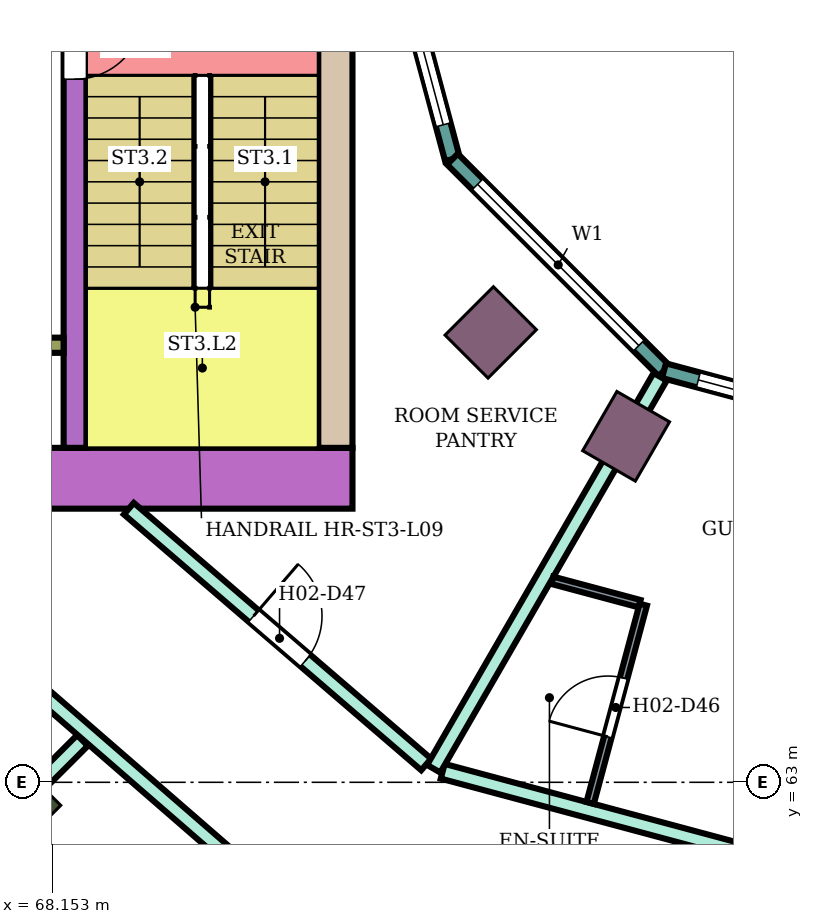
"""IFC4 building model, lengths in metres.
Left out: names, types, materials, properties, quantities, classifications, styles, units other than length and angle.
Written with IfcOpenShell. Run it as: python <this file> out.ifc"""

import sys

from ifc_helpers import new_model, si_unit, direction, frame, frame_2d, origin, origin_2d, place, context, subcontext, project, spatial, rectangle, extrude, element, fill, save


model = new_model("IFC4")
c1 = context("Model", 3, precision=1e-05, world=origin(), true_north=direction((0.0, 1.0)))
c2 = subcontext(c1, "Body", "Model", "MODEL_VIEW")
j1 = project(units=[si_unit("LENGTHUNIT", "METRE"), si_unit("PLANEANGLEUNIT", "RADIAN")], contexts=[c1])
p1 = place(None, origin())
s1 = spatial("IfcSite", under=j1, at=p1, CompositionType="ELEMENT")
p2 = place(p1, origin())
s2 = spatial("IfcBuilding", under=s1, at=p2, CompositionType="ELEMENT")
p3 = place(p2, frame((0.0, 0.0, 44.0)))
s3 = spatial("IfcBuildingStorey", under=s2, at=p3, CompositionType="ELEMENT", Elevation=44.0)
p4 = place(p3, frame((67.555, 62.555, 0.0), z_axis=(0.0, 0.0, 1.0), x_axis=(-0.707106781187, -0.707106781187, 0.0)))
e1 = element("IfcColumn", 1, at=p4, inside=s3, PredefinedType="COLUMN", context=c2, shape_type="SweptSolid", body=[
    extrude(rectangle(XDim=1.2, YDim=0.8, at=origin_2d()), origin(), (0.0, 0.0, 1.0), 3.8),
])
for number, where, z_axis, x_axis in (
    (2, (73.919, 68.919, 0.0), (0.0, 0.0, 1.0), (-0.707, -0.707, 0.0)),
    (3, (75.7, 67.552, 0.0), (0.0, 0.0, 1.0), (-0.5, -0.866, 0.0)),
):
    element("IfcColumn", number, at=place(p3, frame(where, z_axis=z_axis, x_axis=x_axis)), inside=s3, PredefinedType="COLUMN", context=c2, shape_type="SweptSolid", body=[
        extrude(rectangle(XDim=0.9, YDim=0.8, at=origin_2d()), origin(), (0.0, 0.0, 1.0), 3.8),
    ])
p5 = place(p3, frame((72.1, 67.0, 0.0), z_axis=(0.0, 0.0, 1.0), x_axis=(-1.0, 0.0, 0.0)))
e4 = element("IfcWall", 4, at=p5, inside=s3, PredefinedType="SHEAR", context=c2, shape_type="SweptSolid", body=[
    extrude(rectangle(XDim=14.7, YDim=0.8, at=frame_2d((7.35, 0.0))), origin(), (0.0, 0.0, 1.0), 3.48),
])
p6 = place(p5, frame((4.2, 0.0, 0.0)))
e5 = element("IfcOpeningElement", 5, at=p6, cuts=e4, PredefinedType="OPENING", context=c2, shape_type="SweptSolid", body=[
    extrude(rectangle(XDim=2.4, YDim=2.4, at=frame_2d((1.2, 1.2))), frame((0.0, 0.41, 0.0), z_axis=(0.0, -1.0, 0.0), x_axis=(1.0, 0.0, 0.0)), (0.0, 0.0, 1.0), 0.82),
])
p7 = place(p3, frame((71.875, 75.0, 0.0), z_axis=(0.0, 0.0, 1.0), x_axis=(0.0, -1.0, 0.0)))
e6 = element("IfcWall", 6, at=p7, inside=s3, PredefinedType="SHEAR", context=c2, shape_type="SweptSolid", body=[
    extrude(rectangle(XDim=7.6, YDim=0.45, at=frame_2d((3.8, 0.0))), origin(), (0.0, 0.0, 1.0), 3.48),
])
p8 = place(p3, frame((68.45, 75.0, 0.0), z_axis=(0.0, 0.0, 1.0), x_axis=(0.0, -1.0, 0.0)))
e7 = element("IfcWall", 7, at=p8, inside=s3, PredefinedType="SHEAR", context=c2, shape_type="SweptSolid", body=[
    extrude(rectangle(XDim=7.6, YDim=0.3, at=frame_2d((3.8, 0.0))), origin(), (0.0, 0.0, 1.0), 3.48),
])
p9 = place(p8, frame((1.85, 0.0, 0.0)))
e8 = element("IfcOpeningElement", 8, at=p9, cuts=e7, PredefinedType="OPENING", context=c2, shape_type="SweptSolid", body=[
    extrude(rectangle(XDim=0.9, YDim=2.1, at=frame_2d((0.45, 1.05))), frame((0.0, 0.16, 0.0), z_axis=(0.0, -1.0, 0.0), x_axis=(1.0, 0.0, 0.0)), (0.0, 0.0, 1.0), 0.32),
])
p10 = place(p3, frame((68.3, 68.75, 0.0), z_axis=(0.0, 0.0, 1.0), x_axis=(-1.0, 0.0, 0.0)))
e9 = element("IfcWall", 9, at=p10, inside=s3, PredefinedType="SHEAR", context=c2, shape_type="SweptSolid", body=[
    extrude(rectangle(XDim=4.65, YDim=0.2, at=frame_2d((2.325, 0.0))), origin(), (0.0, 0.0, 1.0), 3.48),
])
p11 = place(p3, frame((72.396, 75.0, 0.0), z_axis=(0.0, 0.0, 1.0), x_axis=(0.258789828301, -0.965933654434, 0.0)))
e10 = element("IfcWall", 10, at=p11, inside=s3, PredefinedType="NOTDEFINED", context=c2, shape_type="SweptSolid", body=[
    extrude(rectangle(XDim=3.936, YDim=0.2, at=frame_2d((1.968, 0.0))), origin(), (0.0, 0.0, 1.0), 3.8),
])
p12 = place(p11, frame((0.468, 0.0, 0.9)))
e11 = element("IfcOpeningElement", 11, at=p12, cuts=e10, PredefinedType="OPENING", context=c2, shape_type="SweptSolid", body=[
    extrude(rectangle(XDim=3.0, YDim=2.3, at=frame_2d((1.5, 1.15))), frame((0.0, 0.11, 0.0), z_axis=(0.0, -1.0, 0.0), x_axis=(1.0, 0.0, 0.0)), (0.0, 0.0, 1.0), 0.22),
])
p13 = place(p3, frame((73.415, 71.198, 0.0), z_axis=(0.0, 0.0, 1.0), x_axis=(0.707106781187, -0.707106781187, 0.0)))
e12 = element("IfcWall", 12, at=p13, inside=s3, PredefinedType="NOTDEFINED", context=c2, shape_type="SweptSolid", body=[
    extrude(rectangle(XDim=3.936, YDim=0.2, at=frame_2d((1.968, 0.0))), origin(), (0.0, 0.0, 1.0), 3.8),
])
p14 = place(p13, frame((0.468, 0.0, 0.9)))
e13 = element("IfcOpeningElement", 13, at=p14, cuts=e12, PredefinedType="OPENING", context=c2, shape_type="SweptSolid", body=[
    extrude(rectangle(XDim=3.0, YDim=2.3, at=frame_2d((1.5, 1.15))), frame((0.0, 0.11, 0.0), z_axis=(0.0, -1.0, 0.0), x_axis=(1.0, 0.0, 0.0)), (0.0, 0.0, 1.0), 0.22),
])
p15 = place(p3, frame((76.198, 68.415, 0.0), z_axis=(0.0, 0.0, 1.0), x_axis=(0.965933654434, -0.258789828301, 0.0)))
e14 = element("IfcWall", 14, at=p15, inside=s3, PredefinedType="NOTDEFINED", context=c2, shape_type="SweptSolid", body=[
    extrude(rectangle(XDim=3.936, YDim=0.2, at=frame_2d((1.968, 0.0))), origin(), (0.0, 0.0, 1.0), 3.8),
])
p16 = place(p15, frame((0.468, 0.0, 0.9)))
e15 = element("IfcOpeningElement", 15, at=p16, cuts=e14, PredefinedType="OPENING", context=c2, shape_type="SweptSolid", body=[
    extrude(rectangle(XDim=3.0, YDim=2.3, at=frame_2d((1.5, 1.15))), frame((0.0, 0.11, 0.0), z_axis=(0.0, -1.0, 0.0), x_axis=(1.0, 0.0, 0.0)), (0.0, 0.0, 1.0), 0.22),
])
p17 = place(p3, frame((63.594, 58.598, 0.0), z_axis=(0.0, 0.0, 1.0), x_axis=(0.707228748718, 0.706984792613, 0.0)))
e16 = element("IfcWall", 16, at=p17, inside=s3, PredefinedType="PARTITIONING", context=c2, shape_type="SweptSolid", body=[
    extrude(rectangle(XDim=7.005, YDim=0.2, at=frame_2d((3.503, 0.0))), origin(), (0.0, 0.0, 1.0), 3.35),
])
p18 = place(p3, frame((67.082, 64.972, 0.0), z_axis=(0.0, 0.0, 1.0), x_axis=(0.755033632617, -0.655686063309, 0.0)))
e17 = element("IfcWall", 17, at=p18, inside=s3, PredefinedType="PARTITIONING", context=c2, shape_type="SweptSolid", body=[
    extrude(rectangle(XDim=6.185, YDim=0.2, at=frame_2d((3.093, 0.0))), origin(), (0.0, 0.0, 1.0), 3.35),
])
p19 = place(p18, frame((4.778, 0.0, 0.0)))
e18 = element("IfcOpeningElement", 18, at=p19, cuts=e17, PredefinedType="OPENING", context=c2, shape_type="SweptSolid", body=[
    extrude(rectangle(XDim=1.1, YDim=2.1, at=frame_2d((0.55, 1.05))), frame((0.0, 0.11, 0.0), z_axis=(0.0, -1.0, 0.0), x_axis=(1.0, 0.0, 0.0)), (0.0, 0.0, 1.0), 0.22),
])
p20 = place(p3, frame((69.158, 66.6, 0.0), z_axis=(0.0, 0.0, 1.0), x_axis=(0.758063092745, -0.652181222835, 0.0)))
e19 = element("IfcWall", 19, at=p20, inside=s3, PredefinedType="PARTITIONING", context=c2, shape_type="SweptSolid", body=[
    extrude(rectangle(XDim=5.16, YDim=0.2, at=frame_2d((2.58, 0.0))), origin(), (0.0, 0.0, 1.0), 3.35),
])
p21 = place(p20, frame((2.165, 0.0, 0.0)))
e20 = element("IfcOpeningElement", 20, at=p21, cuts=e19, PredefinedType="OPENING", context=c2, shape_type="SweptSolid", body=[
    extrude(rectangle(XDim=0.9, YDim=2.1, at=frame_2d((0.45, 1.05))), frame((0.0, 0.11, 0.0), z_axis=(0.0, -1.0, 0.0), x_axis=(1.0, 0.0, 0.0)), (0.0, 0.0, 1.0), 0.22),
])
p22 = place(p3, frame((73.287, 63.145, 0.0), z_axis=(0.0, 0.0, 1.0), x_axis=(0.965854200194, -0.259086209526, 0.0)))
e21 = element("IfcWall", 21, at=p22, inside=s3, PredefinedType="PARTITIONING", context=c2, shape_type="SweptSolid", body=[
    extrude(rectangle(XDim=6.82, YDim=0.2, at=frame_2d((3.41, 0.0))), origin(), (0.0, 0.0, 1.0), 3.35),
])
p23 = place(p22, frame((5.4, 0.0, 0.0)))
e22 = element("IfcOpeningElement", 22, at=p23, cuts=e21, PredefinedType="OPENING", context=c2, shape_type="SweptSolid", body=[
    extrude(rectangle(XDim=1.0, YDim=2.1, at=frame_2d((0.5, 1.05))), frame((0.0, 0.11, 0.0), z_axis=(0.0, -1.0, 0.0), x_axis=(1.0, 0.0, 0.0)), (0.0, 0.0, 1.0), 0.22),
])
p24 = place(p3, frame((73.169, 63.178, 0.0), z_axis=(0.0, 0.0, 1.0), x_axis=(0.50020860964, 0.865904929448, 0.0)))
e23 = element("IfcWall", 23, at=p24, inside=s3, PredefinedType="PARTITIONING", context=c2, shape_type="SweptSolid", body=[
    extrude(rectangle(XDim=5.955, YDim=0.2, at=frame_2d((2.978, 0.0))), origin(), (0.0, 0.0, 1.0), 3.35),
])
p25 = place(p3, frame((74.729, 65.657, 0.0), z_axis=(0.0, 0.0, 1.0), x_axis=(0.965948051503, -0.258736085224, 0.0)))
e24 = element("IfcWall", 24, at=p25, inside=s3, PredefinedType="PARTITIONING", context=c2, shape_type="SweptSolid", body=[
    extrude(rectangle(XDim=1.189, YDim=0.1, at=frame_2d((0.594, 0.0))), origin(), (0.0, 0.0, 1.0), 3.35),
])
p26 = place(p3, frame((75.227, 62.729, 0.0), z_axis=(0.0, 0.0, 1.0), x_axis=(0.258945475746, 0.965891940432, 0.0)))
e25 = element("IfcWall", 25, at=p26, inside=s3, PredefinedType="PARTITIONING", context=c2, shape_type="SweptSolid", body=[
    extrude(rectangle(XDim=2.7, YDim=0.1, at=frame_2d((1.35, 0.0))), origin(), (0.0, 0.0, 1.0), 3.35),
])
p27 = place(p26, frame((0.9, 0.0, 0.0)))
e26 = element("IfcOpeningElement", 26, at=p27, cuts=e25, PredefinedType="OPENING", context=c2, shape_type="SweptSolid", body=[
    extrude(rectangle(XDim=0.8, YDim=2.1, at=frame_2d((0.4, 1.05))), frame((0.0, 0.06, 0.0), z_axis=(0.0, -1.0, 0.0), x_axis=(1.0, 0.0, 0.0)), (0.0, 0.0, 1.0), 0.12),
])
p28 = place(p12, origin())
e27 = element("IfcWindow", 27, at=p28, inside=s3, PartitioningType="SINGLE_PANEL", PredefinedType="WINDOW", context=c2, shape_type="SweptSolid", body=[
    extrude(rectangle(XDim=3.0, YDim=2.3, at=frame_2d((1.5, 1.15))), frame((0.0, 0.03, 0.0), z_axis=(0.0, -1.0, 0.0), x_axis=(1.0, 0.0, 0.0)), (0.0, 0.0, 1.0), 0.06),
])
fill(e11, e27)
p29 = place(p14, origin())
e28 = element("IfcWindow", 28, at=p29, inside=s3, PartitioningType="SINGLE_PANEL", PredefinedType="WINDOW", context=c2, shape_type="SweptSolid", body=[
    extrude(rectangle(XDim=3.0, YDim=2.3, at=frame_2d((1.5, 1.15))), frame((0.0, 0.03, 0.0), z_axis=(0.0, -1.0, 0.0), x_axis=(1.0, 0.0, 0.0)), (0.0, 0.0, 1.0), 0.06),
])
fill(e13, e28)
p30 = place(p16, origin())
e29 = element("IfcWindow", 29, at=p30, inside=s3, PartitioningType="SINGLE_PANEL", PredefinedType="WINDOW", context=c2, shape_type="SweptSolid", body=[
    extrude(rectangle(XDim=3.0, YDim=2.3, at=frame_2d((1.5, 1.15))), frame((0.0, 0.03, 0.0), z_axis=(0.0, -1.0, 0.0), x_axis=(1.0, 0.0, 0.0)), (0.0, 0.0, 1.0), 0.06),
])
fill(e15, e29)
p31 = place(p27, origin())
e30 = element("IfcDoor", 30, at=p31, inside=s3, OperationType="SINGLE_SWING_LEFT", PredefinedType="DOOR", context=c2, shape_type="SweptSolid", body=[
    extrude(rectangle(XDim=0.8, YDim=2.1, at=frame_2d((0.4, 1.05))), frame((0.0, 0.025, 0.0), z_axis=(0.0, -1.0, 0.0), x_axis=(1.0, 0.0, 0.0)), (0.0, 0.0, 1.0), 0.05),
])
fill(e26, e30)
p32 = place(p21, origin())
e31 = element("IfcDoor", 31, at=p32, inside=s3, OperationType="SINGLE_SWING_LEFT", PredefinedType="DOOR", context=c2, shape_type="SweptSolid", body=[
    extrude(rectangle(XDim=0.9, YDim=2.1, at=frame_2d((0.45, 1.05))), frame((0.0, 0.025, 0.0), z_axis=(0.0, -1.0, 0.0), x_axis=(1.0, 0.0, 0.0)), (0.0, 0.0, 1.0), 0.05),
])
fill(e20, e31)
p33 = place(p9, origin())
e32 = element("IfcDoor", 32, at=p33, inside=s3, OperationType="SINGLE_SWING_LEFT", PredefinedType="DOOR", context=c2, shape_type="SweptSolid", body=[
    extrude(rectangle(XDim=0.9, YDim=2.1, at=frame_2d((0.45, 1.05))), frame((0.0, 0.025, 0.0), z_axis=(0.0, -1.0, 0.0), x_axis=(1.0, 0.0, 0.0)), (0.0, 0.0, 1.0), 0.05),
])
fill(e8, e32)
save(model, sys.argv[1])
